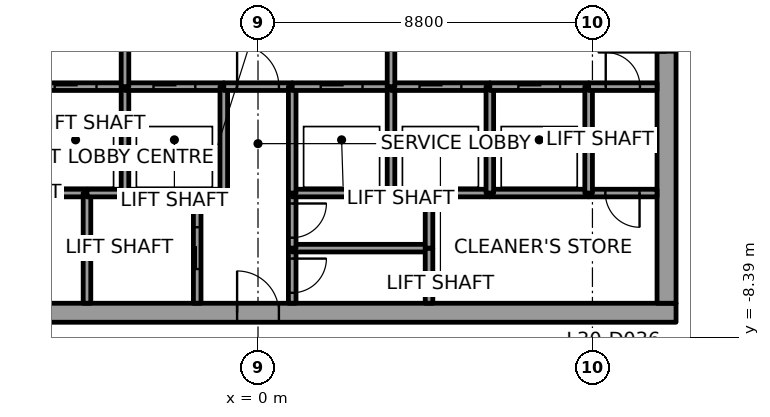
"""IFC4 building model, lengths in metres.
Left out: names, types, materials, properties, quantities, classifications, styles, units other than length and angle.
Written with IfcOpenShell. Run it as: python <this file> out.ifc"""

import sys

from ifc_helpers import new_model, si_unit, direction, frame, frame_2d, origin, place, context, subcontext, project, spatial, rectangle, extrude, element, fill, save


model = new_model("IFC4")
c1 = context("Model", 3, precision=1e-05, world=origin(), true_north=direction((0.0, 1.0)))
c2 = subcontext(c1, "Body", "Model", "MODEL_VIEW")
j1 = project(units=[si_unit("LENGTHUNIT", "METRE"), si_unit("PLANEANGLEUNIT", "RADIAN")], contexts=[c1])
p1 = place(None, origin())
s1 = spatial("IfcSite", under=j1, at=p1, CompositionType="ELEMENT")
p2 = place(p1, origin())
s2 = spatial("IfcBuilding", under=s1, at=p2, CompositionType="ELEMENT")
p3 = place(p2, frame((0.0, 0.0, 141.8)))
s3 = spatial("IfcBuildingStorey", under=s2, at=p3, CompositionType="ELEMENT", Elevation=141.8)
p4 = place(p3, frame((-11.0, -7.75, 0.0), z_axis=(0.0, 0.0, 1.0), x_axis=(1.0, 0.0, 0.0)))
e1 = element("IfcWall", 1, at=p4, inside=s3, PredefinedType="SHEAR", context=c2, shape_type="SweptSolid", body=[
    extrude(rectangle(XDim=22.0, YDim=0.5, at=frame_2d((11.0, 0.0))), origin(), (0.0, 0.0, 1.0), 4.0),
])
p5 = place(p4, frame((10.45, 0.0, 0.0)))
e2 = element("IfcOpeningElement", 2, at=p5, cuts=e1, PredefinedType="OPENING", context=c2, shape_type="SweptSolid", body=[
    extrude(rectangle(XDim=1.1, YDim=2.1, at=frame_2d((0.55, 1.05))), frame((0.0, 0.25, 0.0), z_axis=(0.0, -1.0, 0.0), x_axis=(1.0, 0.0, 0.0)), (0.0, 0.0, 1.0), 0.5),
])
p6 = place(p3, frame((10.75, -7.5, 0.0), z_axis=(0.0, 0.0, 1.0), x_axis=(0.0, 1.0, 0.0)))
e3 = element("IfcWall", 3, at=p6, inside=s3, PredefinedType="SHEAR", context=c2, shape_type="SweptSolid", body=[
    extrude(rectangle(XDim=15.0, YDim=0.5, at=frame_2d((7.5, 0.0))), origin(), (0.0, 0.0, 1.0), 4.0),
])
p7 = place(p6, frame((6.6, 0.0, 0.0)))
e4 = element("IfcOpeningElement", 4, at=p7, cuts=e3, PredefinedType="OPENING", context=c2, shape_type="SweptSolid", body=[
    extrude(rectangle(XDim=1.8, YDim=2.1, at=frame_2d((0.9, 1.05))), frame((0.0, 0.25, 0.0), z_axis=(0.0, -1.0, 0.0), x_axis=(1.0, 0.0, 0.0)), (0.0, 0.0, 1.0), 0.5),
])
p8 = place(p3, frame((-6.1, -4.6, 0.0), z_axis=(0.0, 0.0, 1.0), x_axis=(1.0, 0.0, 0.0)))
e5 = element("IfcWall", 5, at=p8, inside=s3, PredefinedType="SOLIDWALL", context=c2, shape_type="SweptSolid", body=[
    extrude(rectangle(XDim=1.6, YDim=0.2, at=frame_2d((0.8, 0.0))), origin(), (0.0, 0.0, 1.0), 3.85),
])
p9 = place(p3, frame((-6.1, -1.8, 0.0), z_axis=(0.0, 0.0, 1.0), x_axis=(1.0, 0.0, 0.0)))
e6 = element("IfcWall", 6, at=p9, inside=s3, PredefinedType="SOLIDWALL", context=c2, shape_type="SweptSolid", body=[
    extrude(rectangle(XDim=2.6, YDim=0.2, at=frame_2d((1.3, 0.0))), origin(), (0.0, 0.0, 1.0), 3.85),
])
p10 = place(p9, frame((0.75, 0.0, 0.0)))
e7 = element("IfcOpeningElement", 7, at=p10, cuts=e6, PredefinedType="OPENING", context=c2, shape_type="SweptSolid", body=[
    extrude(rectangle(XDim=1.1, YDim=2.1, at=frame_2d((0.55, 1.05))), frame((0.0, 0.1, 0.0), z_axis=(0.0, -1.0, 0.0), x_axis=(1.0, 0.0, 0.0)), (0.0, 0.0, 1.0), 0.2),
])
p11 = place(p3, frame((-4.5, -4.6, 0.0), z_axis=(0.0, 0.0, 1.0), x_axis=(0.0, -1.0, 0.0)))
e8 = element("IfcWall", 8, at=p11, inside=s3, PredefinedType="SOLIDWALL", context=c2, shape_type="SweptSolid", body=[
    extrude(rectangle(XDim=2.9, YDim=0.2, at=frame_2d((1.45, 0.0))), origin(), (0.0, 0.0, 1.0), 3.85),
])
p12 = place(p3, frame((-4.5, -4.6, 0.0), z_axis=(0.0, 0.0, 1.0), x_axis=(1.0, 0.0, 0.0)))
e9 = element("IfcWall", 9, at=p12, inside=s3, PredefinedType="SOLIDWALL", context=c2, shape_type="SweptSolid", body=[
    extrude(rectangle(XDim=1.0, YDim=0.2, at=frame_2d((0.5, 0.0))), origin(), (0.0, 0.0, 1.0), 3.85),
])
p13 = place(p3, frame((-3.5, -4.6, 0.0), z_axis=(0.0, 0.0, 1.0), x_axis=(1.0, 0.0, 0.0)))
e10 = element("IfcWall", 10, at=p13, inside=s3, PredefinedType="SOLIDWALL", context=c2, shape_type="SweptSolid", body=[
    extrude(rectangle(XDim=1.9, YDim=0.2, at=frame_2d((0.95, 0.0))), origin(), (0.0, 0.0, 1.0), 3.85),
])
p14 = place(p3, frame((-3.5, -4.6, 0.0), z_axis=(0.0, 0.0, 1.0), x_axis=(0.0, 1.0, 0.0)))
e11 = element("IfcWall", 11, at=p14, inside=s3, PredefinedType="SOLIDWALL", context=c2, shape_type="SweptSolid", body=[
    extrude(rectangle(XDim=2.8, YDim=0.2, at=frame_2d((1.4, 0.0))), origin(), (0.0, 0.0, 1.0), 3.85),
])
p15 = place(p3, frame((-3.5, -1.8, 0.0), z_axis=(0.0, 0.0, 1.0), x_axis=(1.0, 0.0, 0.0)))
e12 = element("IfcWall", 12, at=p15, inside=s3, PredefinedType="SOLIDWALL", context=c2, shape_type="SweptSolid", body=[
    extrude(rectangle(XDim=2.6, YDim=0.2, at=frame_2d((1.3, 0.0))), origin(), (0.0, 0.0, 1.0), 3.85),
])
p16 = place(p15, frame((0.75, 0.0, 0.0)))
e13 = element("IfcOpeningElement", 13, at=p16, cuts=e12, PredefinedType="OPENING", context=c2, shape_type="SweptSolid", body=[
    extrude(rectangle(XDim=1.1, YDim=2.1, at=frame_2d((0.55, 1.05))), frame((0.0, 0.1, 0.0), z_axis=(0.0, -1.0, 0.0), x_axis=(1.0, 0.0, 0.0)), (0.0, 0.0, 1.0), 0.2),
])
p17 = place(p3, frame((-3.5, 1.8, 0.0), z_axis=(0.0, 0.0, 1.0), x_axis=(0.0, -1.0, 0.0)))
e14 = element("IfcWall", 14, at=p17, inside=s3, PredefinedType="SOLIDWALL", context=c2, shape_type="SweptSolid", body=[
    extrude(rectangle(XDim=3.6, YDim=0.2, at=frame_2d((1.8, 0.0))), origin(), (0.0, 0.0, 1.0), 3.85),
])
p18 = place(p17, frame((1.05, 0.0, 0.0)))
e15 = element("IfcOpeningElement", 15, at=p18, cuts=e14, PredefinedType="OPENING", context=c2, shape_type="SweptSolid", body=[
    extrude(rectangle(XDim=1.5, YDim=2.1, at=frame_2d((0.75, 1.05))), frame((0.0, 0.1, 0.0), z_axis=(0.0, -1.0, 0.0), x_axis=(1.0, 0.0, 0.0)), (0.0, 0.0, 1.0), 0.2),
])
p19 = place(p3, frame((-1.6, -7.5, 0.0), z_axis=(0.0, 0.0, 1.0), x_axis=(0.0, 1.0, 0.0)))
e16 = element("IfcWall", 16, at=p19, inside=s3, PredefinedType="SOLIDWALL", context=c2, shape_type="SweptSolid", body=[
    extrude(rectangle(XDim=2.9, YDim=0.2, at=frame_2d((1.45, 0.0))), origin(), (0.0, 0.0, 1.0), 3.85),
])
p20 = place(p19, frame((0.9, 0.0, 0.0)))
e17 = element("IfcOpeningElement", 17, at=p20, cuts=e16, PredefinedType="OPENING", context=c2, shape_type="SweptSolid", body=[
    extrude(rectangle(XDim=1.1, YDim=2.1, at=frame_2d((0.55, 1.05))), frame((0.0, 0.1, 0.0), z_axis=(0.0, -1.0, 0.0), x_axis=(1.0, 0.0, 0.0)), (0.0, 0.0, 1.0), 0.2),
])
p21 = place(p3, frame((-1.6, -4.6, 0.0), z_axis=(0.0, 0.0, 1.0), x_axis=(1.0, 0.0, 0.0)))
e18 = element("IfcWall", 18, at=p21, inside=s3, PredefinedType="SOLIDWALL", context=c2, shape_type="SweptSolid", body=[
    extrude(rectangle(XDim=0.7, YDim=0.2, at=frame_2d((0.35, 0.0))), origin(), (0.0, 0.0, 1.0), 3.85),
])
p22 = place(p3, frame((-0.9, -4.6, 0.0), z_axis=(0.0, 0.0, 1.0), x_axis=(0.0, 1.0, 0.0)))
e19 = element("IfcWall", 19, at=p22, inside=s3, PredefinedType="SOLIDWALL", context=c2, shape_type="SweptSolid", body=[
    extrude(rectangle(XDim=2.8, YDim=0.2, at=frame_2d((1.4, 0.0))), origin(), (0.0, 0.0, 1.0), 3.85),
])
p23 = place(p3, frame((-0.9, -1.8, 0.0), z_axis=(0.0, 0.0, 1.0), x_axis=(1.0, 0.0, 0.0)))
e20 = element("IfcWall", 20, at=p23, inside=s3, PredefinedType="SOLIDWALL", context=c2, shape_type="SweptSolid", body=[
    extrude(rectangle(XDim=1.8, YDim=0.2, at=frame_2d((0.9, 0.0))), origin(), (0.0, 0.0, 1.0), 3.85),
])
p24 = place(p23, frame((0.35, 0.0, 0.0)))
e21 = element("IfcOpeningElement", 21, at=p24, cuts=e20, PredefinedType="OPENING", context=c2, shape_type="SweptSolid", body=[
    extrude(rectangle(XDim=1.1, YDim=2.1, at=frame_2d((0.55, 1.05))), frame((0.0, 0.1, 0.0), z_axis=(0.0, -1.0, 0.0), x_axis=(1.0, 0.0, 0.0)), (0.0, 0.0, 1.0), 0.2),
])
p25 = place(p3, frame((0.9, -6.05, 0.0), z_axis=(0.0, 0.0, 1.0), x_axis=(0.0, -1.0, 0.0)))
e22 = element("IfcWall", 22, at=p25, inside=s3, PredefinedType="SOLIDWALL", context=c2, shape_type="SweptSolid", body=[
    extrude(rectangle(XDim=1.45, YDim=0.2, at=frame_2d((0.725, 0.0))), origin(), (0.0, 0.0, 1.0), 3.85),
])
p26 = place(p25, frame((0.275, 0.0, 0.0)))
e23 = element("IfcOpeningElement", 23, at=p26, cuts=e22, PredefinedType="OPENING", context=c2, shape_type="SweptSolid", body=[
    extrude(rectangle(XDim=0.9, YDim=2.1, at=frame_2d((0.45, 1.05))), frame((0.0, 0.1, 0.0), z_axis=(0.0, -1.0, 0.0), x_axis=(1.0, 0.0, 0.0)), (0.0, 0.0, 1.0), 0.2),
])
p27 = place(p3, frame((4.5, -6.05, 0.0), z_axis=(0.0, 0.0, 1.0), x_axis=(-1.0, 0.0, 0.0)))
e24 = element("IfcWall", 24, at=p27, inside=s3, PredefinedType="SOLIDWALL", context=c2, shape_type="SweptSolid", body=[
    extrude(rectangle(XDim=3.6, YDim=0.2, at=frame_2d((1.8, 0.0))), origin(), (0.0, 0.0, 1.0), 3.85),
])
p28 = place(p3, frame((0.9, -4.6, 0.0), z_axis=(0.0, 0.0, 1.0), x_axis=(0.0, -1.0, 0.0)))
e25 = element("IfcWall", 25, at=p28, inside=s3, PredefinedType="SOLIDWALL", context=c2, shape_type="SweptSolid", body=[
    extrude(rectangle(XDim=1.45, YDim=0.2, at=frame_2d((0.725, 0.0))), origin(), (0.0, 0.0, 1.0), 3.85),
])
p29 = place(p28, frame((0.275, 0.0, 0.0)))
e26 = element("IfcOpeningElement", 26, at=p29, cuts=e25, PredefinedType="OPENING", context=c2, shape_type="SweptSolid", body=[
    extrude(rectangle(XDim=0.9, YDim=2.1, at=frame_2d((0.45, 1.05))), frame((0.0, 0.1, 0.0), z_axis=(0.0, -1.0, 0.0), x_axis=(1.0, 0.0, 0.0)), (0.0, 0.0, 1.0), 0.2),
])
p30 = place(p3, frame((3.5, -4.6, 0.0), z_axis=(0.0, 0.0, 1.0), x_axis=(-1.0, 0.0, 0.0)))
e27 = element("IfcWall", 27, at=p30, inside=s3, PredefinedType="SOLIDWALL", context=c2, shape_type="SweptSolid", body=[
    extrude(rectangle(XDim=2.6, YDim=0.2, at=frame_2d((1.3, 0.0))), origin(), (0.0, 0.0, 1.0), 3.85),
])
p31 = place(p3, frame((0.9, -1.8, 0.0), z_axis=(0.0, 0.0, 1.0), x_axis=(0.0, -1.0, 0.0)))
e28 = element("IfcWall", 28, at=p31, inside=s3, PredefinedType="SOLIDWALL", context=c2, shape_type="SweptSolid", body=[
    extrude(rectangle(XDim=2.8, YDim=0.2, at=frame_2d((1.4, 0.0))), origin(), (0.0, 0.0, 1.0), 3.85),
])
p32 = place(p3, frame((0.9, -1.8, 0.0), z_axis=(0.0, 0.0, 1.0), x_axis=(1.0, 0.0, 0.0)))
e29 = element("IfcWall", 29, at=p32, inside=s3, PredefinedType="SOLIDWALL", context=c2, shape_type="SweptSolid", body=[
    extrude(rectangle(XDim=2.6, YDim=0.2, at=frame_2d((1.3, 0.0))), origin(), (0.0, 0.0, 1.0), 3.85),
])
p33 = place(p32, frame((0.75, 0.0, 0.0)))
e30 = element("IfcOpeningElement", 30, at=p33, cuts=e29, PredefinedType="OPENING", context=c2, shape_type="SweptSolid", body=[
    extrude(rectangle(XDim=1.1, YDim=2.1, at=frame_2d((0.55, 1.05))), frame((0.0, 0.1, 0.0), z_axis=(0.0, -1.0, 0.0), x_axis=(1.0, 0.0, 0.0)), (0.0, 0.0, 1.0), 0.2),
])
p34 = place(p3, frame((4.5, -4.6, 0.0), z_axis=(0.0, 0.0, 1.0), x_axis=(-1.0, 0.0, 0.0)))
e31 = element("IfcWall", 31, at=p34, inside=s3, PredefinedType="SOLIDWALL", context=c2, shape_type="SweptSolid", body=[
    extrude(rectangle(XDim=1.0, YDim=0.2, at=frame_2d((0.5, 0.0))), origin(), (0.0, 0.0, 1.0), 3.85),
])
p35 = place(p3, frame((3.5, -4.6, 0.0), z_axis=(0.0, 0.0, 1.0), x_axis=(0.0, 1.0, 0.0)))
e32 = element("IfcWall", 32, at=p35, inside=s3, PredefinedType="SOLIDWALL", context=c2, shape_type="SweptSolid", body=[
    extrude(rectangle(XDim=2.8, YDim=0.2, at=frame_2d((1.4, 0.0))), origin(), (0.0, 0.0, 1.0), 3.85),
])
p36 = place(p3, frame((3.5, -1.8, 0.0), z_axis=(0.0, 0.0, 1.0), x_axis=(1.0, 0.0, 0.0)))
e33 = element("IfcWall", 33, at=p36, inside=s3, PredefinedType="SOLIDWALL", context=c2, shape_type="SweptSolid", body=[
    extrude(rectangle(XDim=2.6, YDim=0.2, at=frame_2d((1.3, 0.0))), origin(), (0.0, 0.0, 1.0), 3.85),
])
p37 = place(p36, frame((0.75, 0.0, 0.0)))
e34 = element("IfcOpeningElement", 34, at=p37, cuts=e33, PredefinedType="OPENING", context=c2, shape_type="SweptSolid", body=[
    extrude(rectangle(XDim=1.1, YDim=2.1, at=frame_2d((0.55, 1.05))), frame((0.0, 0.1, 0.0), z_axis=(0.0, -1.0, 0.0), x_axis=(1.0, 0.0, 0.0)), (0.0, 0.0, 1.0), 0.2),
])
p38 = place(p3, frame((3.5, -1.8, 0.0), z_axis=(0.0, 0.0, 1.0), x_axis=(0.0, 1.0, 0.0)))
e35 = element("IfcWall", 35, at=p38, inside=s3, PredefinedType="SOLIDWALL", context=c2, shape_type="SweptSolid", body=[
    extrude(rectangle(XDim=3.6, YDim=0.2, at=frame_2d((1.8, 0.0))), origin(), (0.0, 0.0, 1.0), 3.85),
])
p39 = place(p38, frame((1.05, 0.0, 0.0)))
e36 = element("IfcOpeningElement", 36, at=p39, cuts=e35, PredefinedType="OPENING", context=c2, shape_type="SweptSolid", body=[
    extrude(rectangle(XDim=1.5, YDim=2.1, at=frame_2d((0.75, 1.05))), frame((0.0, 0.1, 0.0), z_axis=(0.0, -1.0, 0.0), x_axis=(1.0, 0.0, 0.0)), (0.0, 0.0, 1.0), 0.2),
])
for number, where, z_axis, x_axis in (
    (37, (4.5, -6.05, 0.0), (0.0, 0.0, 1.0), (0.0, -1.0, 0.0)),
    (38, (4.5, -4.6, 0.0), (0.0, 0.0, 1.0), (0.0, -1.0, 0.0)),
):
    element("IfcWall", number, at=place(p3, frame(where, z_axis=z_axis, x_axis=x_axis)), inside=s3, PredefinedType="SOLIDWALL", context=c2, shape_type="SweptSolid", body=[
        extrude(rectangle(XDim=1.45, YDim=0.2, at=frame_2d((0.725, 0.0))), origin(), (0.0, 0.0, 1.0), 3.85),
    ])
p40 = place(p3, frame((6.1, -4.6, 0.0), z_axis=(0.0, 0.0, 1.0), x_axis=(-1.0, 0.0, 0.0)))
e39 = element("IfcWall", 39, at=p40, inside=s3, PredefinedType="SOLIDWALL", context=c2, shape_type="SweptSolid", body=[
    extrude(rectangle(XDim=1.6, YDim=0.2, at=frame_2d((0.8, 0.0))), origin(), (0.0, 0.0, 1.0), 3.85),
])
p41 = place(p3, frame((8.7, -4.6, 0.0), z_axis=(0.0, 0.0, 1.0), x_axis=(-1.0, 0.0, 0.0)))
e40 = element("IfcWall", 40, at=p41, inside=s3, PredefinedType="SOLIDWALL", context=c2, shape_type="SweptSolid", body=[
    extrude(rectangle(XDim=2.6, YDim=0.2, at=frame_2d((1.3, 0.0))), origin(), (0.0, 0.0, 1.0), 3.85),
])
p42 = place(p3, frame((6.1, -4.6, 0.0), z_axis=(0.0, 0.0, 1.0), x_axis=(0.0, 1.0, 0.0)))
e41 = element("IfcWall", 41, at=p42, inside=s3, PredefinedType="SOLIDWALL", context=c2, shape_type="SweptSolid", body=[
    extrude(rectangle(XDim=2.8, YDim=0.2, at=frame_2d((1.4, 0.0))), origin(), (0.0, 0.0, 1.0), 3.85),
])
p43 = place(p3, frame((6.1, -1.8, 0.0), z_axis=(0.0, 0.0, 1.0), x_axis=(1.0, 0.0, 0.0)))
e42 = element("IfcWall", 42, at=p43, inside=s3, PredefinedType="SOLIDWALL", context=c2, shape_type="SweptSolid", body=[
    extrude(rectangle(XDim=2.6, YDim=0.2, at=frame_2d((1.3, 0.0))), origin(), (0.0, 0.0, 1.0), 3.85),
])
p44 = place(p43, frame((0.75, 0.0, 0.0)))
e43 = element("IfcOpeningElement", 43, at=p44, cuts=e42, PredefinedType="OPENING", context=c2, shape_type="SweptSolid", body=[
    extrude(rectangle(XDim=1.1, YDim=2.1, at=frame_2d((0.55, 1.05))), frame((0.0, 0.1, 0.0), z_axis=(0.0, -1.0, 0.0), x_axis=(1.0, 0.0, 0.0)), (0.0, 0.0, 1.0), 0.2),
])
p45 = place(p3, frame((10.5, -4.6, 0.0), z_axis=(0.0, 0.0, 1.0), x_axis=(-1.0, 0.0, 0.0)))
e44 = element("IfcWall", 44, at=p45, inside=s3, PredefinedType="SOLIDWALL", context=c2, shape_type="SweptSolid", body=[
    extrude(rectangle(XDim=1.8, YDim=0.2, at=frame_2d((0.9, 0.0))), origin(), (0.0, 0.0, 1.0), 3.85),
])
p46 = place(p45, frame((0.46, 0.0, 0.0)))
e45 = element("IfcOpeningElement", 45, at=p46, cuts=e44, PredefinedType="OPENING", context=c2, shape_type="SweptSolid", body=[
    extrude(rectangle(XDim=0.9, YDim=2.1, at=frame_2d((0.45, 1.05))), frame((0.0, 0.1, 0.0), z_axis=(0.0, -1.0, 0.0), x_axis=(1.0, 0.0, 0.0)), (0.0, 0.0, 1.0), 0.2),
])
p47 = place(p3, frame((8.7, -1.8, 0.0), z_axis=(0.0, 0.0, 1.0), x_axis=(0.0, -1.0, 0.0)))
e46 = element("IfcWall", 46, at=p47, inside=s3, PredefinedType="SOLIDWALL", context=c2, shape_type="SweptSolid", body=[
    extrude(rectangle(XDim=2.8, YDim=0.2, at=frame_2d((1.4, 0.0))), origin(), (0.0, 0.0, 1.0), 3.85),
])
p48 = place(p3, frame((8.7, -1.8, 0.0), z_axis=(0.0, 0.0, 1.0), x_axis=(1.0, 0.0, 0.0)))
e47 = element("IfcWall", 47, at=p48, inside=s3, PredefinedType="SOLIDWALL", context=c2, shape_type="SweptSolid", body=[
    extrude(rectangle(XDim=1.8, YDim=0.2, at=frame_2d((0.9, 0.0))), origin(), (0.0, 0.0, 1.0), 3.85),
])
p49 = place(p48, frame((0.45, 0.0, 0.0)))
e48 = element("IfcOpeningElement", 48, at=p49, cuts=e47, PredefinedType="OPENING", context=c2, shape_type="SweptSolid", body=[
    extrude(rectangle(XDim=0.9, YDim=2.1, at=frame_2d((0.45, 1.05))), frame((0.0, 0.1, 0.0), z_axis=(0.0, -1.0, 0.0), x_axis=(1.0, 0.0, 0.0)), (0.0, 0.0, 1.0), 0.2),
])
p50 = place(p10, origin())
e49 = element("IfcDoor", 49, at=p50, inside=s3, OperationType="SLIDING_TO_RIGHT", PredefinedType="DOOR", context=c2, shape_type="SweptSolid", body=[
    extrude(rectangle(XDim=1.1, YDim=2.1, at=frame_2d((0.55, 1.05))), frame((0.0, 0.025, 0.0), z_axis=(0.0, -1.0, 0.0), x_axis=(1.0, 0.0, 0.0)), (0.0, 0.0, 1.0), 0.05),
])
fill(e7, e49)
p51 = place(p16, origin())
e50 = element("IfcDoor", 50, at=p51, inside=s3, OperationType="SLIDING_TO_LEFT", PredefinedType="DOOR", context=c2, shape_type="SweptSolid", body=[
    extrude(rectangle(XDim=1.1, YDim=2.1, at=frame_2d((0.55, 1.05))), frame((0.0, 0.025, 0.0), z_axis=(0.0, -1.0, 0.0), x_axis=(1.0, 0.0, 0.0)), (0.0, 0.0, 1.0), 0.05),
])
fill(e13, e50)
p52 = place(p33, origin())
e51 = element("IfcDoor", 51, at=p52, inside=s3, OperationType="SLIDING_TO_RIGHT", PredefinedType="DOOR", context=c2, shape_type="SweptSolid", body=[
    extrude(rectangle(XDim=1.1, YDim=2.1, at=frame_2d((0.55, 1.05))), frame((0.0, 0.025, 0.0), z_axis=(0.0, -1.0, 0.0), x_axis=(1.0, 0.0, 0.0)), (0.0, 0.0, 1.0), 0.05),
])
fill(e30, e51)
p53 = place(p37, origin())
e52 = element("IfcDoor", 52, at=p53, inside=s3, OperationType="SLIDING_TO_RIGHT", PredefinedType="DOOR", context=c2, shape_type="SweptSolid", body=[
    extrude(rectangle(XDim=1.1, YDim=2.1, at=frame_2d((0.55, 1.05))), frame((0.0, 0.025, 0.0), z_axis=(0.0, -1.0, 0.0), x_axis=(1.0, 0.0, 0.0)), (0.0, 0.0, 1.0), 0.05),
])
fill(e34, e52)
p54 = place(p44, origin())
e53 = element("IfcDoor", 53, at=p54, inside=s3, OperationType="SLIDING_TO_RIGHT", PredefinedType="DOOR", context=c2, shape_type="SweptSolid", body=[
    extrude(rectangle(XDim=1.1, YDim=2.1, at=frame_2d((0.55, 1.05))), frame((0.0, 0.025, 0.0), z_axis=(0.0, -1.0, 0.0), x_axis=(1.0, 0.0, 0.0)), (0.0, 0.0, 1.0), 0.05),
])
fill(e43, e53)
p55 = place(p20, origin())
e54 = element("IfcDoor", 54, at=p55, inside=s3, OperationType="SLIDING_TO_RIGHT", PredefinedType="DOOR", context=c2, shape_type="SweptSolid", body=[
    extrude(rectangle(XDim=1.1, YDim=2.1, at=frame_2d((0.55, 1.05))), frame((0.0, 0.025, 0.0), z_axis=(0.0, -1.0, 0.0), x_axis=(1.0, 0.0, 0.0)), (0.0, 0.0, 1.0), 0.05),
])
fill(e17, e54)
p56 = place(p24, origin())
e55 = element("IfcDoor", 55, at=p56, inside=s3, OperationType="SINGLE_SWING_LEFT", PredefinedType="DOOR", context=c2, shape_type="SweptSolid", body=[
    extrude(rectangle(XDim=1.1, YDim=2.1, at=frame_2d((0.55, 1.05))), frame((0.0, 0.025, 0.0), z_axis=(0.0, -1.0, 0.0), x_axis=(1.0, 0.0, 0.0)), (0.0, 0.0, 1.0), 0.05),
])
fill(e21, e55)
p57 = place(p46, origin())
e56 = element("IfcDoor", 56, at=p57, inside=s3, OperationType="SINGLE_SWING_RIGHT", PredefinedType="DOOR", context=c2, shape_type="SweptSolid", body=[
    extrude(rectangle(XDim=0.9, YDim=2.1, at=frame_2d((0.45, 1.05))), frame((0.0, 0.025, 0.0), z_axis=(0.0, -1.0, 0.0), x_axis=(1.0, 0.0, 0.0)), (0.0, 0.0, 1.0), 0.05),
])
fill(e45, e56)
p58 = place(p49, origin())
e57 = element("IfcDoor", 57, at=p58, inside=s3, OperationType="SINGLE_SWING_RIGHT", PredefinedType="DOOR", context=c2, shape_type="SweptSolid", body=[
    extrude(rectangle(XDim=0.9, YDim=2.1, at=frame_2d((0.45, 1.05))), frame((0.0, 0.025, 0.0), z_axis=(0.0, -1.0, 0.0), x_axis=(1.0, 0.0, 0.0)), (0.0, 0.0, 1.0), 0.05),
])
fill(e48, e57)
p59 = place(p26, origin())
e58 = element("IfcDoor", 58, at=p59, inside=s3, OperationType="SINGLE_SWING_RIGHT", PredefinedType="DOOR", context=c2, shape_type="SweptSolid", body=[
    extrude(rectangle(XDim=0.9, YDim=2.1, at=frame_2d((0.45, 1.05))), frame((0.0, 0.025, 0.0), z_axis=(0.0, -1.0, 0.0), x_axis=(1.0, 0.0, 0.0)), (0.0, 0.0, 1.0), 0.05),
])
fill(e23, e58)
p60 = place(p29, origin())
e59 = element("IfcDoor", 59, at=p60, inside=s3, OperationType="SINGLE_SWING_RIGHT", PredefinedType="DOOR", context=c2, shape_type="SweptSolid", body=[
    extrude(rectangle(XDim=0.9, YDim=2.1, at=frame_2d((0.45, 1.05))), frame((0.0, 0.025, 0.0), z_axis=(0.0, -1.0, 0.0), x_axis=(1.0, 0.0, 0.0)), (0.0, 0.0, 1.0), 0.05),
])
fill(e26, e59)
p61 = place(p7, origin())
e60 = element("IfcDoor", 60, at=p61, inside=s3, OperationType="DOUBLE_DOOR_SINGLE_SWING", PredefinedType="DOOR", context=c2, shape_type="SweptSolid", body=[
    extrude(rectangle(XDim=1.8, YDim=2.1, at=frame_2d((0.9, 1.05))), frame((0.0, 0.025, 0.0), z_axis=(0.0, -1.0, 0.0), x_axis=(1.0, 0.0, 0.0)), (0.0, 0.0, 1.0), 0.05),
])
fill(e4, e60)
p62 = place(p5, origin())
e61 = element("IfcDoor", 61, at=p62, inside=s3, OperationType="SINGLE_SWING_RIGHT", PredefinedType="DOOR", context=c2, shape_type="SweptSolid", body=[
    extrude(rectangle(XDim=1.1, YDim=2.1, at=frame_2d((0.55, 1.05))), frame((0.0, 0.025, 0.0), z_axis=(0.0, -1.0, 0.0), x_axis=(1.0, 0.0, 0.0)), (0.0, 0.0, 1.0), 0.05),
])
fill(e2, e61)
save(model, sys.argv[1])
